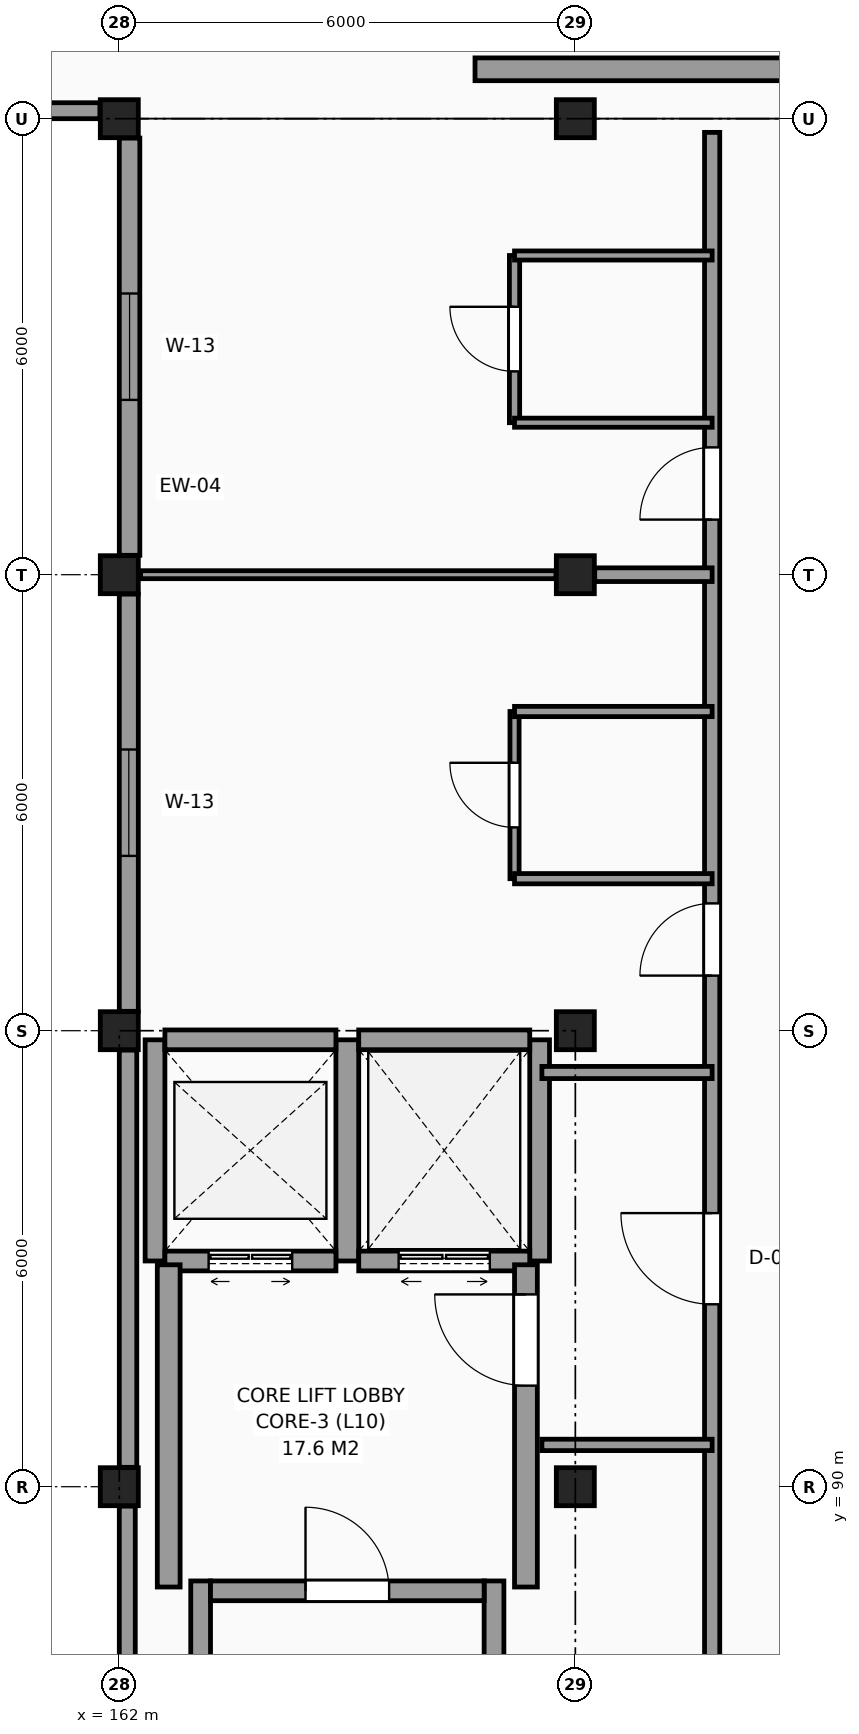
"""IFC4 building model, lengths in metres.
Left out: names, types, materials, properties, quantities, classifications, styles, units other than length and angle.
Written with IfcOpenShell. Run it as: python <this file> out.ifc"""

import sys

from ifc_helpers import new_model, si_unit, direction, frame, frame_2d, origin, origin_2d, place, context, subcontext, project, spatial, rectangle, extrude, element, fill, save


model = new_model("IFC4")
c1 = context("Model", 3, precision=1e-05, world=origin(), true_north=direction((0.0, 1.0)))
c2 = subcontext(c1, "Body", "Model", "MODEL_VIEW")
j1 = project(units=[si_unit("LENGTHUNIT", "METRE"), si_unit("PLANEANGLEUNIT", "RADIAN")], contexts=[c1])
p1 = place(None, origin())
s1 = spatial("IfcSite", under=j1, at=p1, CompositionType="ELEMENT")
p2 = place(p1, origin())
s2 = spatial("IfcBuilding", under=s1, at=p2, CompositionType="ELEMENT")
p3 = place(p2, frame((0.0, 0.0, 41.4)))
s3 = spatial("IfcBuildingStorey", under=s2, at=p3, CompositionType="ELEMENT", Elevation=41.4)
for number, where, z_axis, x_axis in (
    (1, (162.0, 90.0, 0.0), (0.0, 0.0, 1.0), (1.0, 0.0, 0.0)),
    (2, (162.0, 96.0, 0.0), (0.0, 0.0, 1.0), (1.0, 0.0, 0.0)),
    (3, (162.0, 102.0, 0.0), (0.0, 0.0, 1.0), (1.0, 0.0, 0.0)),
    (4, (162.0, 108.0, 0.0), (0.0, 0.0, 1.0), (1.0, 0.0, 0.0)),
    (5, (168.0, 90.0, 0.0), (0.0, 0.0, 1.0), (1.0, 0.0, 0.0)),
    (6, (168.0, 96.0, 0.0), (0.0, 0.0, 1.0), (1.0, 0.0, 0.0)),
    (7, (168.0, 102.0, 0.0), (0.0, 0.0, 1.0), (1.0, 0.0, 0.0)),
    (8, (168.0, 108.0, 0.0), (0.0, 0.0, 1.0), (1.0, 0.0, 0.0)),
):
    element("IfcColumn", number, at=place(p3, frame(where, z_axis=z_axis, x_axis=x_axis)), inside=s3, PredefinedType="COLUMN", context=c2, shape_type="SweptSolid", body=[
        extrude(rectangle(XDim=0.5, YDim=0.5, at=origin_2d()), origin(), (0.0, 0.0, 1.0), 3.3),
    ])
p4 = place(p3, frame((156.255, 108.105, 0.0), z_axis=(0.0, 0.0, 1.0), x_axis=(1.0, 0.0, 0.0)))
e9 = element("IfcWall", 9, at=p4, inside=s3, PredefinedType="SOLIDWALL", context=c2, shape_type="SweptSolid", body=[
    extrude(rectangle(XDim=5.49, YDim=0.21, at=frame_2d((2.745, 0.0))), origin(), (0.0, 0.0, 1.0), 3.06),
])
p5 = place(p3, frame((162.135, 107.745, 0.0), z_axis=(0.0, 0.0, 1.0), x_axis=(0.0, -1.0, 0.0)))
e10 = element("IfcWall", 10, at=p5, inside=s3, PredefinedType="SOLIDWALL", context=c2, shape_type="SweptSolid", body=[
    extrude(rectangle(XDim=5.49, YDim=0.27, at=frame_2d((2.745, 0.0))), origin(), (0.0, 0.0, 1.0), 2.41),
])
p6 = place(p5, frame((2.045, 0.0, 0.8)))
e11 = element("IfcOpeningElement", 11, at=p6, cuts=e10, PredefinedType="OPENING", context=c2, shape_type="SweptSolid", body=[
    extrude(rectangle(XDim=1.4, YDim=1.4, at=frame_2d((0.7, 0.7))), frame((0.0, 0.145, 0.0), z_axis=(0.0, -1.0, 0.0), x_axis=(1.0, 0.0, 0.0)), (0.0, 0.0, 1.0), 0.29),
])
p7 = place(p3, frame((162.125, 101.745, 0.0), z_axis=(0.0, 0.0, 1.0), x_axis=(0.0, -1.0, 0.0)))
e12 = element("IfcWall", 12, at=p7, inside=s3, PredefinedType="SOLIDWALL", context=c2, shape_type="SweptSolid", body=[
    extrude(rectangle(XDim=5.49, YDim=0.25, at=frame_2d((2.745, 0.0))), origin(), (0.0, 0.0, 1.0), 2.41),
])
p8 = place(p7, frame((2.045, 0.0, 0.8)))
e13 = element("IfcOpeningElement", 13, at=p8, cuts=e12, PredefinedType="OPENING", context=c2, shape_type="SweptSolid", body=[
    extrude(rectangle(XDim=1.4, YDim=1.4, at=frame_2d((0.7, 0.7))), frame((0.0, 0.135, 0.0), z_axis=(0.0, -1.0, 0.0), x_axis=(1.0, 0.0, 0.0)), (0.0, 0.0, 1.0), 0.27),
])
p9 = place(p3, frame((162.115, 95.745, 0.0), z_axis=(0.0, 0.0, 1.0), x_axis=(0.0, -1.0, 0.0)))
e14 = element("IfcWall", 14, at=p9, inside=s3, PredefinedType="SOLIDWALL", context=c2, shape_type="SweptSolid", body=[
    extrude(rectangle(XDim=5.49, YDim=0.23, at=frame_2d((2.745, 0.0))), origin(), (0.0, 0.0, 1.0), 2.41),
])
p10 = place(p3, frame((162.105, 89.745, 0.0), z_axis=(0.0, 0.0, 1.0), x_axis=(0.0, -1.0, 0.0)))
e15 = element("IfcWall", 15, at=p10, inside=s3, PredefinedType="SOLIDWALL", context=c2, shape_type="SweptSolid", body=[
    extrude(rectangle(XDim=5.49, YDim=0.21, at=frame_2d((2.745, 0.0))), origin(), (0.0, 0.0, 1.0), 2.41),
])
p11 = place(p3, frame((166.68, 108.65, 0.0), z_axis=(0.0, 0.0, 1.0), x_axis=(1.0, 0.0, 0.0)))
e16 = element("IfcWall", 16, at=p11, inside=s3, PredefinedType="SHEAR", context=c2, shape_type="SweptSolid", body=[
    extrude(rectangle(XDim=4.24, YDim=0.3, at=frame_2d((2.12, 0.0))), origin(), (0.0, 0.0, 1.0), 3.3),
])
for number, where, z_axis, x_axis in (
    (17, (163.07, 78.04, 0.0), (0.0, 0.0, 1.0), (0.0, 1.0, 0.0)),
    (18, (166.93, 78.04, 0.0), (0.0, 0.0, 1.0), (0.0, 1.0, 0.0)),
):
    element("IfcWall", number, at=place(p3, frame(where, z_axis=z_axis, x_axis=x_axis)), inside=s3, PredefinedType="SHEAR", context=c2, shape_type="SweptSolid", body=[
        extrude(rectangle(XDim=10.72, YDim=0.26, at=frame_2d((5.36, 0.0))), origin(), (0.0, 0.0, 1.0), 3.3),
    ])
p12 = place(p3, frame((163.2, 88.63, 0.0), z_axis=(0.0, 0.0, 1.0), x_axis=(1.0, 0.0, 0.0)))
e19 = element("IfcWall", 19, at=p12, inside=s3, PredefinedType="SHEAR", context=c2, shape_type="SweptSolid", body=[
    extrude(rectangle(XDim=3.6, YDim=0.26, at=frame_2d((1.8, 0.0))), origin(), (0.0, 0.0, 1.0), 3.3),
])
p13 = place(p12, frame((1.25, 0.0, 0.0)))
e20 = element("IfcOpeningElement", 20, at=p13, cuts=e19, PredefinedType="OPENING", context=c2, shape_type="SweptSolid", body=[
    extrude(rectangle(XDim=1.1, YDim=2.15, at=frame_2d((0.55, 1.075))), frame((0.0, 0.14, 0.0), z_axis=(0.0, -1.0, 0.0), x_axis=(1.0, 0.0, 0.0)), (0.0, 0.0, 1.0), 0.28),
])
p14 = place(p3, frame((162.47, 92.97, 0.0), z_axis=(0.0, 0.0, 1.0), x_axis=(0.0, 1.0, 0.0)))
e21 = element("IfcWall", 21, at=p14, inside=s3, PredefinedType="SHEAR", context=c2, shape_type="SweptSolid", body=[
    extrude(rectangle(XDim=2.91, YDim=0.26, at=frame_2d((1.455, 0.0))), origin(), (0.0, 0.0, 1.0), 3.3),
])
p15 = place(p3, frame((165.0, 92.97, 0.0), z_axis=(0.0, 0.0, 1.0), x_axis=(0.0, 1.0, 0.0)))
e22 = element("IfcWall", 22, at=p15, inside=s3, PredefinedType="SHEAR", context=c2, shape_type="SweptSolid", body=[
    extrude(rectangle(XDim=2.91, YDim=0.3, at=frame_2d((1.455, 0.0))), origin(), (0.0, 0.0, 1.0), 3.3),
])
p16 = place(p3, frame((162.6, 95.88, 0.0), z_axis=(0.0, 0.0, 1.0), x_axis=(1.0, 0.0, 0.0)))
e23 = element("IfcWall", 23, at=p16, inside=s3, PredefinedType="SHEAR", context=c2, shape_type="SweptSolid", body=[
    extrude(rectangle(XDim=2.25, YDim=0.26, at=frame_2d((1.125, 0.0))), origin(), (0.0, 0.0, 1.0), 3.3),
])
p17 = place(p3, frame((162.6, 92.97, 0.0), z_axis=(0.0, 0.0, 1.0), x_axis=(1.0, 0.0, 0.0)))
e24 = element("IfcWall", 24, at=p17, inside=s3, PredefinedType="SHEAR", context=c2, shape_type="SweptSolid", body=[
    extrude(rectangle(XDim=2.25, YDim=0.26, at=frame_2d((1.125, 0.0))), origin(), (0.0, 0.0, 1.0), 3.3),
])
p18 = place(p17, frame((0.575, 0.0, 0.0)))
e25 = element("IfcOpeningElement", 25, at=p18, cuts=e24, PredefinedType="OPENING", context=c2, shape_type="SweptSolid", body=[
    extrude(rectangle(XDim=1.1, YDim=2.2, at=frame_2d((0.55, 1.1))), frame((0.0, 0.14, 0.0), z_axis=(0.0, -1.0, 0.0), x_axis=(1.0, 0.0, 0.0)), (0.0, 0.0, 1.0), 0.28),
])
p19 = place(p3, frame((167.53, 92.97, 0.0), z_axis=(0.0, 0.0, 1.0), x_axis=(0.0, 1.0, 0.0)))
e26 = element("IfcWall", 26, at=p19, inside=s3, PredefinedType="SHEAR", context=c2, shape_type="SweptSolid", body=[
    extrude(rectangle(XDim=2.91, YDim=0.26, at=frame_2d((1.455, 0.0))), origin(), (0.0, 0.0, 1.0), 3.3),
])
p20 = place(p3, frame((165.15, 95.88, 0.0), z_axis=(0.0, 0.0, 1.0), x_axis=(1.0, 0.0, 0.0)))
e27 = element("IfcWall", 27, at=p20, inside=s3, PredefinedType="SHEAR", context=c2, shape_type="SweptSolid", body=[
    extrude(rectangle(XDim=2.25, YDim=0.26, at=frame_2d((1.125, 0.0))), origin(), (0.0, 0.0, 1.0), 3.3),
])
p21 = place(p3, frame((165.15, 92.97, 0.0), z_axis=(0.0, 0.0, 1.0), x_axis=(1.0, 0.0, 0.0)))
e28 = element("IfcWall", 28, at=p21, inside=s3, PredefinedType="SHEAR", context=c2, shape_type="SweptSolid", body=[
    extrude(rectangle(XDim=2.25, YDim=0.26, at=frame_2d((1.125, 0.0))), origin(), (0.0, 0.0, 1.0), 3.3),
])
p22 = place(p21, frame((0.525, 0.0, 0.0)))
e29 = element("IfcOpeningElement", 29, at=p22, cuts=e28, PredefinedType="OPENING", context=c2, shape_type="SweptSolid", body=[
    extrude(rectangle(XDim=1.2, YDim=2.25, at=frame_2d((0.6, 1.125))), frame((0.0, 0.14, 0.0), z_axis=(0.0, -1.0, 0.0), x_axis=(1.0, 0.0, 0.0)), (0.0, 0.0, 1.0), 0.28),
])
p23 = place(p3, frame((167.35, 88.68, 0.0), z_axis=(0.0, 0.0, 1.0), x_axis=(0.0, 1.0, 0.0)))
e30 = element("IfcWall", 30, at=p23, inside=s3, PredefinedType="SHEAR", context=c2, shape_type="SweptSolid", body=[
    extrude(rectangle(XDim=4.24, YDim=0.3, at=frame_2d((2.12, 0.0))), origin(), (0.0, 0.0, 1.0), 3.3),
])
p24 = place(p23, frame((2.65, 0.0, 0.0)))
e31 = element("IfcOpeningElement", 31, at=p24, cuts=e30, PredefinedType="OPENING", context=c2, shape_type="SweptSolid", body=[
    extrude(rectangle(XDim=1.2, YDim=2.2, at=frame_2d((0.6, 1.1))), frame((0.0, 0.16, 0.0), z_axis=(0.0, -1.0, 0.0), x_axis=(1.0, 0.0, 0.0)), (0.0, 0.0, 1.0), 0.32),
])
p25 = place(p3, frame((162.65, 88.68, 0.0), z_axis=(0.0, 0.0, 1.0), x_axis=(0.0, 1.0, 0.0)))
e32 = element("IfcWall", 32, at=p25, inside=s3, PredefinedType="SHEAR", context=c2, shape_type="SweptSolid", body=[
    extrude(rectangle(XDim=4.24, YDim=0.3, at=frame_2d((2.12, 0.0))), origin(), (0.0, 0.0, 1.0), 3.3),
])
p26 = place(p3, frame((167.2, 98.0, 0.0), z_axis=(0.0, 0.0, 1.0), x_axis=(0.0, 1.0, 0.0)))
e33 = element("IfcWall", 33, at=p26, inside=s3, PredefinedType="PARTITIONING", context=c2, shape_type="SweptSolid", body=[
    extrude(rectangle(XDim=2.2, YDim=0.12, at=frame_2d((1.1, 0.0))), origin(), (0.0, 0.0, 1.0), 3.06),
])
p27 = place(p26, frame((0.675, 0.0, 0.0)))
e34 = element("IfcOpeningElement", 34, at=p27, cuts=e33, PredefinedType="OPENING", context=c2, shape_type="SweptSolid", body=[
    extrude(rectangle(XDim=0.85, YDim=2.1, at=frame_2d((0.425, 1.05))), frame((0.0, 0.07, 0.0), z_axis=(0.0, -1.0, 0.0), x_axis=(1.0, 0.0, 0.0)), (0.0, 0.0, 1.0), 0.14),
])
p28 = place(p3, frame((167.2, 104.0, 0.0), z_axis=(0.0, 0.0, 1.0), x_axis=(0.0, 1.0, 0.0)))
e35 = element("IfcWall", 35, at=p28, inside=s3, PredefinedType="PARTITIONING", context=c2, shape_type="SweptSolid", body=[
    extrude(rectangle(XDim=2.2, YDim=0.135, at=frame_2d((1.1, 0.0))), origin(), (0.0, 0.0, 1.0), 3.06),
])
p29 = place(p28, frame((0.675, 0.0, 0.0)))
e36 = element("IfcOpeningElement", 36, at=p29, cuts=e35, PredefinedType="OPENING", context=c2, shape_type="SweptSolid", body=[
    extrude(rectangle(XDim=0.85, YDim=2.1, at=frame_2d((0.425, 1.05))), frame((0.0, 0.078, 0.0), z_axis=(0.0, -1.0, 0.0), x_axis=(1.0, 0.0, 0.0)), (0.0, 0.0, 1.0), 0.155),
])
p30 = place(p3, frame((169.8, 42.275, 0.0), z_axis=(0.0, 0.0, 1.0), x_axis=(0.0, 1.0, 0.0)))
e37 = element("IfcWall", 37, at=p30, inside=s3, PredefinedType="PARTITIONING", context=c2, shape_type="SweptSolid", body=[
    extrude(rectangle(XDim=65.545, YDim=0.2, at=frame_2d((32.772, 0.0))), origin(), (0.0, 0.0, 1.0), 3.06),
])
p31 = place(p30, frame((50.125, 0.0, 0.0)))
e38 = element("IfcOpeningElement", 38, at=p31, cuts=e37, PredefinedType="OPENING", context=c2, shape_type="SweptSolid", body=[
    extrude(rectangle(XDim=1.2, YDim=2.2, at=frame_2d((0.6, 1.1))), frame((0.0, 0.11, 0.0), z_axis=(0.0, -1.0, 0.0), x_axis=(1.0, 0.0, 0.0)), (0.0, 0.0, 1.0), 0.22),
])
p32 = place(p30, frame((31.925, 0.0, 0.0)))
e39 = element("IfcOpeningElement", 39, at=p32, cuts=e37, PredefinedType="OPENING", context=c2, shape_type="SweptSolid", body=[
    extrude(rectangle(XDim=1.6, YDim=2.25, at=frame_2d((0.8, 1.125))), frame((0.0, 0.11, 0.0), z_axis=(0.0, -1.0, 0.0), x_axis=(1.0, 0.0, 0.0)), (0.0, 0.0, 1.0), 0.22),
])
p33 = place(p30, frame((0.4, 0.0, 0.0)))
e40 = element("IfcOpeningElement", 40, at=p33, cuts=e37, PredefinedType="OPENING", context=c2, shape_type="SweptSolid", body=[
    extrude(rectangle(XDim=0.95, YDim=2.1, at=frame_2d((0.475, 1.05))), frame((0.0, 0.11, 0.0), z_axis=(0.0, -1.0, 0.0), x_axis=(1.0, 0.0, 0.0)), (0.0, 0.0, 1.0), 0.22),
])
p34 = place(p30, frame((6.45, 0.0, 0.0)))
e41 = element("IfcOpeningElement", 41, at=p34, cuts=e37, PredefinedType="OPENING", context=c2, shape_type="SweptSolid", body=[
    extrude(rectangle(XDim=0.95, YDim=2.1, at=frame_2d((0.475, 1.05))), frame((0.0, 0.11, 0.0), z_axis=(0.0, -1.0, 0.0), x_axis=(1.0, 0.0, 0.0)), (0.0, 0.0, 1.0), 0.22),
])
p35 = place(p30, frame((12.45, 0.0, 0.0)))
e42 = element("IfcOpeningElement", 42, at=p35, cuts=e37, PredefinedType="OPENING", context=c2, shape_type="SweptSolid", body=[
    extrude(rectangle(XDim=0.95, YDim=2.1, at=frame_2d((0.475, 1.05))), frame((0.0, 0.11, 0.0), z_axis=(0.0, -1.0, 0.0), x_axis=(1.0, 0.0, 0.0)), (0.0, 0.0, 1.0), 0.22),
])
p36 = place(p30, frame((18.45, 0.0, 0.0)))
e43 = element("IfcOpeningElement", 43, at=p36, cuts=e37, PredefinedType="OPENING", context=c2, shape_type="SweptSolid", body=[
    extrude(rectangle(XDim=0.95, YDim=2.1, at=frame_2d((0.475, 1.05))), frame((0.0, 0.11, 0.0), z_axis=(0.0, -1.0, 0.0), x_axis=(1.0, 0.0, 0.0)), (0.0, 0.0, 1.0), 0.22),
])
p37 = place(p30, frame((54.45, 0.0, 0.0)))
e44 = element("IfcOpeningElement", 44, at=p37, cuts=e37, PredefinedType="OPENING", context=c2, shape_type="SweptSolid", body=[
    extrude(rectangle(XDim=0.95, YDim=2.1, at=frame_2d((0.475, 1.05))), frame((0.0, 0.11, 0.0), z_axis=(0.0, -1.0, 0.0), x_axis=(1.0, 0.0, 0.0)), (0.0, 0.0, 1.0), 0.22),
])
p38 = place(p30, frame((60.45, 0.0, 0.0)))
e45 = element("IfcOpeningElement", 45, at=p38, cuts=e37, PredefinedType="OPENING", context=c2, shape_type="SweptSolid", body=[
    extrude(rectangle(XDim=0.95, YDim=2.1, at=frame_2d((0.475, 1.05))), frame((0.0, 0.11, 0.0), z_axis=(0.0, -1.0, 0.0), x_axis=(1.0, 0.0, 0.0)), (0.0, 0.0, 1.0), 0.22),
])
p39 = place(p3, frame((167.56, 90.55, 0.0), z_axis=(0.0, 0.0, 1.0), x_axis=(1.0, 0.0, 0.0)))
e46 = element("IfcWall", 46, at=p39, inside=s3, PredefinedType="PARTITIONING", context=c2, shape_type="SweptSolid", body=[
    extrude(rectangle(XDim=2.24, YDim=0.15, at=frame_2d((1.12, 0.0))), origin(), (0.0, 0.0, 1.0), 3.06),
])
p40 = place(p3, frame((167.56, 95.45, 0.0), z_axis=(0.0, 0.0, 1.0), x_axis=(1.0, 0.0, 0.0)))
e47 = element("IfcWall", 47, at=p40, inside=s3, PredefinedType="PARTITIONING", context=c2, shape_type="SweptSolid", body=[
    extrude(rectangle(XDim=2.24, YDim=0.16, at=frame_2d((1.12, 0.0))), origin(), (0.0, 0.0, 1.0), 3.06),
])
for number, where, z_axis, x_axis in (
    (48, (167.2, 98.0, 0.0), (0.0, 0.0, 1.0), (1.0, 0.0, 0.0)),
    (49, (167.2, 100.2, 0.0), (0.0, 0.0, 1.0), (1.0, 0.0, 0.0)),
):
    element("IfcWall", number, at=place(p3, frame(where, z_axis=z_axis, x_axis=x_axis)), inside=s3, PredefinedType="PARTITIONING", context=c2, shape_type="SweptSolid", body=[
        extrude(rectangle(XDim=2.6, YDim=0.135, at=frame_2d((1.3, 0.0))), origin(), (0.0, 0.0, 1.0), 3.06),
    ])
p41 = place(p3, frame((162.28, 102.0, 0.0), z_axis=(0.0, 0.0, 1.0), x_axis=(1.0, 0.0, 0.0)))
e50 = element("IfcWall", 50, at=p41, inside=s3, PredefinedType="PARTITIONING", context=c2, shape_type="SweptSolid", body=[
    extrude(rectangle(XDim=5.465, YDim=0.105, at=frame_2d((2.732, 0.0))), origin(), (0.0, 0.0, 1.0), 2.61),
])
p42 = place(p3, frame((168.255, 102.0, 0.0), z_axis=(0.0, 0.0, 1.0), x_axis=(1.0, 0.0, 0.0)))
e51 = element("IfcWall", 51, at=p42, inside=s3, PredefinedType="PARTITIONING", context=c2, shape_type="SweptSolid", body=[
    extrude(rectangle(XDim=1.545, YDim=0.18, at=frame_2d((0.772, 0.0))), origin(), (0.0, 0.0, 1.0), 2.77),
])
for number, where, z_axis, x_axis in (
    (52, (167.2, 104.0, 0.0), (0.0, 0.0, 1.0), (1.0, 0.0, 0.0)),
    (53, (167.2, 106.2, 0.0), (0.0, 0.0, 1.0), (1.0, 0.0, 0.0)),
):
    element("IfcWall", number, at=place(p3, frame(where, z_axis=z_axis, x_axis=x_axis)), inside=s3, PredefinedType="PARTITIONING", context=c2, shape_type="SweptSolid", body=[
        extrude(rectangle(XDim=2.6, YDim=0.12, at=frame_2d((1.3, 0.0))), origin(), (0.0, 0.0, 1.0), 3.06),
    ])
p43 = place(p8, origin())
e54 = element("IfcWindow", 54, at=p43, inside=s3, PartitioningType="SINGLE_PANEL", PredefinedType="WINDOW", context=c2, shape_type="SweptSolid", body=[
    extrude(rectangle(XDim=1.4, YDim=1.4, at=frame_2d((0.7, 0.7))), frame((0.0, 0.03, 0.0), z_axis=(0.0, -1.0, 0.0), x_axis=(1.0, 0.0, 0.0)), (0.0, 0.0, 1.0), 0.06),
])
fill(e13, e54)
p44 = place(p6, origin())
e55 = element("IfcWindow", 55, at=p44, inside=s3, PartitioningType="SINGLE_PANEL", PredefinedType="WINDOW", context=c2, shape_type="SweptSolid", body=[
    extrude(rectangle(XDim=1.4, YDim=1.4, at=frame_2d((0.7, 0.7))), frame((0.0, 0.03, 0.0), z_axis=(0.0, -1.0, 0.0), x_axis=(1.0, 0.0, 0.0)), (0.0, 0.0, 1.0), 0.06),
])
fill(e11, e55)
p45 = place(p13, origin())
e56 = element("IfcDoor", 56, at=p45, inside=s3, OperationType="SINGLE_SWING_LEFT", PredefinedType="DOOR", context=c2, shape_type="SweptSolid", body=[
    extrude(rectangle(XDim=1.1, YDim=2.15, at=frame_2d((0.55, 1.075))), frame((0.0, 0.025, 0.0), z_axis=(0.0, -1.0, 0.0), x_axis=(1.0, 0.0, 0.0)), (0.0, 0.0, 1.0), 0.05),
])
fill(e20, e56)
p46 = place(p18, origin())
e57 = element("IfcDoor", 57, at=p46, inside=s3, OperationType="DOUBLE_DOOR_SLIDING", PredefinedType="DOOR", context=c2, shape_type="SweptSolid", body=[
    extrude(rectangle(XDim=1.1, YDim=2.2, at=frame_2d((0.55, 1.1))), frame((0.0, 0.025, 0.0), z_axis=(0.0, -1.0, 0.0), x_axis=(1.0, 0.0, 0.0)), (0.0, 0.0, 1.0), 0.05),
])
fill(e25, e57)
p47 = place(p22, origin())
e58 = element("IfcDoor", 58, at=p47, inside=s3, OperationType="DOUBLE_DOOR_SLIDING", PredefinedType="DOOR", context=c2, shape_type="SweptSolid", body=[
    extrude(rectangle(XDim=1.2, YDim=2.25, at=frame_2d((0.6, 1.125))), frame((0.0, 0.025, 0.0), z_axis=(0.0, -1.0, 0.0), x_axis=(1.0, 0.0, 0.0)), (0.0, 0.0, 1.0), 0.05),
])
fill(e29, e58)
p48 = place(p24, origin())
e59 = element("IfcDoor", 59, at=p48, inside=s3, OperationType="SINGLE_SWING_RIGHT", PredefinedType="DOOR", context=c2, shape_type="SweptSolid", body=[
    extrude(rectangle(XDim=1.2, YDim=2.2, at=frame_2d((0.6, 1.1))), frame((0.0, 0.025, 0.0), z_axis=(0.0, -1.0, 0.0), x_axis=(1.0, 0.0, 0.0)), (0.0, 0.0, 1.0), 0.05),
])
fill(e31, e59)
p49 = place(p31, origin())
e60 = element("IfcDoor", 60, at=p49, inside=s3, OperationType="SINGLE_SWING_RIGHT", PredefinedType="DOOR", context=c2, shape_type="SweptSolid", body=[
    extrude(rectangle(XDim=1.2, YDim=2.2, at=frame_2d((0.6, 1.1))), frame((0.0, 0.025, 0.0), z_axis=(0.0, -1.0, 0.0), x_axis=(1.0, 0.0, 0.0)), (0.0, 0.0, 1.0), 0.05),
])
fill(e38, e60)
p50 = place(p27, origin())
e61 = element("IfcDoor", 61, at=p50, inside=s3, OperationType="SINGLE_SWING_RIGHT", PredefinedType="DOOR", context=c2, shape_type="SweptSolid", body=[
    extrude(rectangle(XDim=0.85, YDim=2.1, at=frame_2d((0.425, 1.05))), frame((0.0, 0.025, 0.0), z_axis=(0.0, -1.0, 0.0), x_axis=(1.0, 0.0, 0.0)), (0.0, 0.0, 1.0), 0.05),
])
fill(e34, e61)
p51 = place(p37, origin())
e62 = element("IfcDoor", 62, at=p51, inside=s3, OperationType="SINGLE_SWING_LEFT", PredefinedType="DOOR", context=c2, shape_type="SweptSolid", body=[
    extrude(rectangle(XDim=0.95, YDim=2.1, at=frame_2d((0.475, 1.05))), frame((0.0, 0.025, 0.0), z_axis=(0.0, -1.0, 0.0), x_axis=(1.0, 0.0, 0.0)), (0.0, 0.0, 1.0), 0.05),
])
fill(e44, e62)
p52 = place(p29, origin())
e63 = element("IfcDoor", 63, at=p52, inside=s3, OperationType="SINGLE_SWING_RIGHT", PredefinedType="DOOR", context=c2, shape_type="SweptSolid", body=[
    extrude(rectangle(XDim=0.85, YDim=2.1, at=frame_2d((0.425, 1.05))), frame((0.0, 0.025, 0.0), z_axis=(0.0, -1.0, 0.0), x_axis=(1.0, 0.0, 0.0)), (0.0, 0.0, 1.0), 0.05),
])
fill(e36, e63)
p53 = place(p38, origin())
e64 = element("IfcDoor", 64, at=p53, inside=s3, OperationType="SINGLE_SWING_LEFT", PredefinedType="DOOR", context=c2, shape_type="SweptSolid", body=[
    extrude(rectangle(XDim=0.95, YDim=2.1, at=frame_2d((0.475, 1.05))), frame((0.0, 0.025, 0.0), z_axis=(0.0, -1.0, 0.0), x_axis=(1.0, 0.0, 0.0)), (0.0, 0.0, 1.0), 0.05),
])
fill(e45, e64)
save(model, sys.argv[1])
